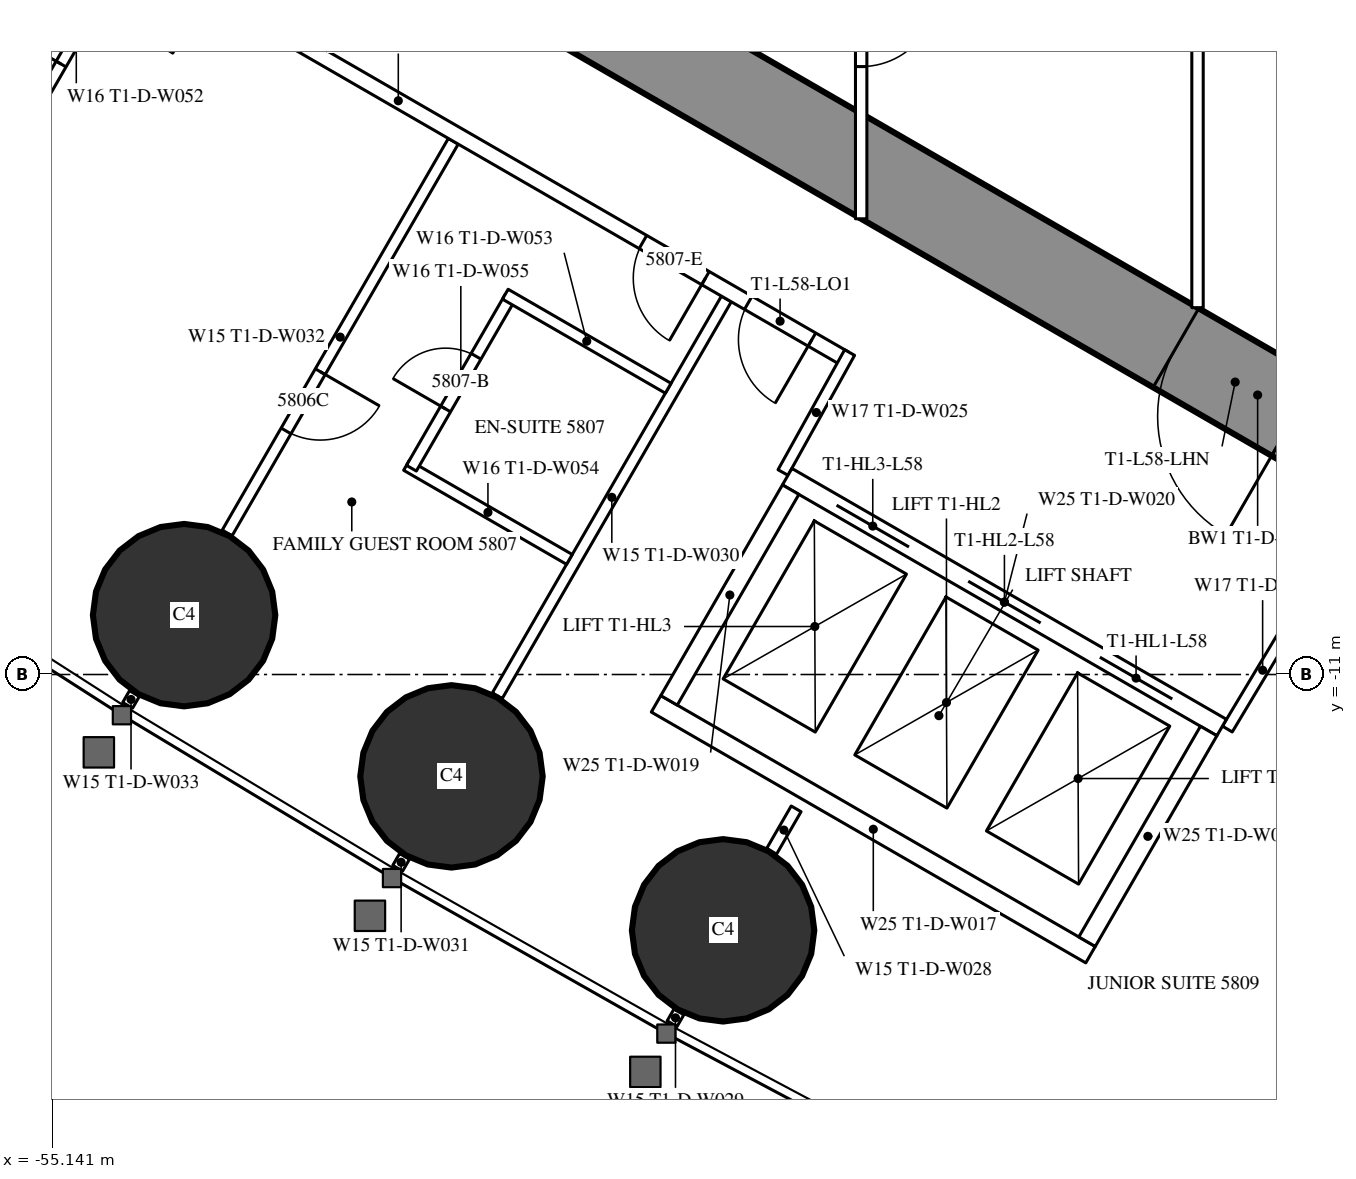
"""IFC4 building model, lengths in metres.
Left out: names, types, materials, properties, quantities, classifications, styles, units other than length and angle.
Written with IfcOpenShell. Run it as: python <this file> out.ifc"""

import sys

from ifc_helpers import new_model, si_unit, direction, frame, frame_2d, origin, origin_2d, place, context, subcontext, project, spatial, rectangle, circle, extrude, element, fill, save


model = new_model("IFC4")
c1 = context("Model", 3, precision=1e-05, world=origin(), true_north=direction((0.0, 1.0)))
c2 = subcontext(c1, "Body", "Model", "MODEL_VIEW")
j1 = project(units=[si_unit("LENGTHUNIT", "METRE"), si_unit("PLANEANGLEUNIT", "RADIAN")], contexts=[c1])
p1 = place(None, origin())
s1 = spatial("IfcSite", under=j1, at=p1, CompositionType="ELEMENT")
p2 = place(p1, origin())
s2 = spatial("IfcBuilding", under=s1, at=p2, CompositionType="ELEMENT")
p3 = place(p2, frame((0.0, 0.0, 218.9)))
s3 = spatial("IfcBuildingStorey", under=s2, at=p3, CompositionType="ELEMENT", Elevation=218.9)
for number, where, z_axis, x_axis in (
    (1, (-53.408, -10.219, 0.0), (0.0, 0.0, 1.0), (1.0, 0.0, 0.0)),
    (2, (-49.89, -12.34, 0.0), (0.0, 0.0, 1.0), (1.0, 0.0, 0.0)),
    (3, (-46.317, -14.365, 0.0), (0.0, 0.0, 1.0), (1.0, 0.0, 0.0)),
):
    element("IfcColumn", number, at=place(p3, frame(where, z_axis=z_axis, x_axis=x_axis)), inside=s3, PredefinedType="COLUMN", context=c2, shape_type="SweptSolid", body=[
        extrude(circle(Radius=1.2, at=origin_2d()), origin(), (0.0, 0.0, 1.0), 3.6),
    ])
p4 = place(p3, frame((-27.2, -14.3, 0.0), z_axis=(0.0, 0.0, 1.0), x_axis=(-0.866024021859, 0.500002393557, 0.0)))
e4 = element("IfcWall", 4, at=p4, inside=s3, PredefinedType="SHEAR", context=c2, shape_type="SweptSolid", body=[
    extrude(rectangle(XDim=27.907, YDim=1.2, at=frame_2d((13.954, 0.0))), origin(), (0.0, 0.0, 1.0), 3.6),
])
p5 = place(p4, frame((4.6, 0.0, 0.0)))
e5 = element("IfcOpeningElement", 5, at=p5, cuts=e4, PredefinedType="OPENING", context=c2, shape_type="SweptSolid", body=[
    extrude(rectangle(XDim=1.0, YDim=2.2, at=frame_2d((0.5, 1.1))), frame((0.0, 0.61, 0.0), z_axis=(0.0, -1.0, 0.0), x_axis=(1.0, 0.0, 0.0)), (0.0, 0.0, 1.0), 1.22),
])
p6 = place(p4, frame((13.395, 0.0, 0.0)))
e6 = element("IfcOpeningElement", 6, at=p6, cuts=e4, PredefinedType="OPENING", context=c2, shape_type="SweptSolid", body=[
    extrude(rectangle(XDim=1.8, YDim=2.2, at=frame_2d((0.9, 1.1))), frame((0.0, 0.61, 0.0), z_axis=(0.0, -1.0, 0.0), x_axis=(1.0, 0.0, 0.0)), (0.0, 0.0, 1.0), 1.22),
])
p7 = place(p3, frame((-46.898, -15.439, 0.0), z_axis=(0.0, 0.0, 1.0), x_axis=(-0.500232303069, -0.865891241997, 0.0)))
e7 = element("IfcWall", 7, at=p7, inside=s3, PredefinedType="PARTITIONING", context=c2, shape_type="SweptSolid", body=[
    extrude(rectangle(XDim=0.18, YDim=0.15, at=frame_2d((0.09, 0.0))), origin(), (0.0, 0.0, 1.0), 2.45),
])
p8 = place(p3, frame((-46.274, -6.059, 0.0), z_axis=(0.0, 0.0, 1.0), x_axis=(-0.500020471368, -0.866013584312, 0.0)))
e8 = element("IfcWall", 8, at=p8, inside=s3, PredefinedType="PARTITIONING", context=c2, shape_type="SweptSolid", body=[
    extrude(rectangle(XDim=6.028, YDim=0.15, at=frame_2d((3.014, 0.0))), origin(), (0.0, 0.0, 1.0), 2.45),
])
p9 = place(p3, frame((-50.508, -13.392, 0.0), z_axis=(0.0, 0.0, 1.0), x_axis=(-0.499644091975, -0.866230789891, 0.0)))
e9 = element("IfcWall", 9, at=p9, inside=s3, PredefinedType="PARTITIONING", context=c2, shape_type="SweptSolid", body=[
    extrude(rectangle(XDim=0.18, YDim=0.15, at=frame_2d((0.09, 0.0))), origin(), (0.0, 0.0, 1.0), 2.45),
])
p10 = place(p3, frame((-49.866, -3.985, 0.0), z_axis=(0.0, 0.0, 1.0), x_axis=(-0.500000694566, -0.866025002776, 0.0)))
e10 = element("IfcWall", 10, at=p10, inside=s3, PredefinedType="PARTITIONING", context=c2, shape_type="SweptSolid", body=[
    extrude(rectangle(XDim=5.95, YDim=0.15, at=frame_2d((2.975, 0.0))), origin(), (0.0, 0.0, 1.0), 2.45),
])
p11 = place(p10, frame((3.5, 0.0, 0.0)))
e11 = element("IfcOpeningElement", 11, at=p11, cuts=e10, PredefinedType="OPENING", context=c2, shape_type="SweptSolid", body=[
    extrude(rectangle(XDim=0.9, YDim=2.2, at=frame_2d((0.45, 1.1))), frame((0.0, 0.085, 0.0), z_axis=(0.0, -1.0, 0.0), x_axis=(1.0, 0.0, 0.0)), (0.0, 0.0, 1.0), 0.17),
])
p12 = place(p3, frame((-54.061, -11.25, 0.0), z_axis=(0.0, 0.0, 1.0), x_axis=(-0.500391173478, -0.865799441849, 0.0)))
e12 = element("IfcWall", 12, at=p12, inside=s3, PredefinedType="PARTITIONING", context=c2, shape_type="SweptSolid", body=[
    extrude(rectangle(XDim=0.179, YDim=0.15, at=frame_2d((0.089, 0.0))), origin(), (0.0, 0.0, 1.0), 2.45),
])
p13 = place(p3, frame((-45.356, -12.767, 0.0), z_axis=(0.0, 0.0, 1.0), x_axis=(-0.499886366516, -0.866091000168, 0.0)))
e13 = element("IfcWall", 13, at=p13, inside=s3, PredefinedType="PARTITIONING", context=c2, shape_type="SweptSolid", body=[
    extrude(rectangle(XDim=0.645, YDim=0.15, at=frame_2d((0.322, 0.0))), origin(), (0.0, 0.0, 1.0), 3.35),
])
p14 = place(p3, frame((-44.715, -6.844, 0.0), z_axis=(0.0, 0.0, 1.0), x_axis=(-0.866025261224, 0.500000246922, 0.0)))
e14 = element("IfcWall", 14, at=p14, inside=s3, PredefinedType="PARTITIONING", context=c2, shape_type="SweptSolid", body=[
    extrude(rectangle(XDim=13.567, YDim=0.2, at=frame_2d((6.783, 0.0))), origin(), (0.0, 0.0, 1.0), 3.35),
])
p15 = place(p14, frame((9.667, 0.0, 0.0)))
e15 = element("IfcOpeningElement", 15, at=p15, cuts=e14, PredefinedType="OPENING", context=c2, shape_type="SweptSolid", body=[
    extrude(rectangle(XDim=0.95, YDim=2.2, at=frame_2d((0.475, 1.1))), frame((0.0, 0.11, 0.0), z_axis=(0.0, -1.0, 0.0), x_axis=(1.0, 0.0, 0.0)), (0.0, 0.0, 1.0), 0.22),
])
p16 = place(p14, frame((2.117, 0.0, 0.0)))
e16 = element("IfcOpeningElement", 16, at=p16, cuts=e14, PredefinedType="OPENING", context=c2, shape_type="SweptSolid", body=[
    extrude(rectangle(XDim=0.95, YDim=2.2, at=frame_2d((0.475, 1.1))), frame((0.0, 0.11, 0.0), z_axis=(0.0, -1.0, 0.0), x_axis=(1.0, 0.0, 0.0)), (0.0, 0.0, 1.0), 0.22),
])
p17 = place(p14, frame((0.5, 0.0, 0.0)))
e17 = element("IfcOpeningElement", 17, at=p17, cuts=e14, PredefinedType="OPENING", context=c2, shape_type="SweptSolid", body=[
    extrude(rectangle(XDim=0.967, YDim=2.2, at=frame_2d((0.483, 1.1))), frame((0.0, 0.11, 0.0), z_axis=(0.0, -1.0, 0.0), x_axis=(1.0, 0.0, 0.0)), (0.0, 0.0, 1.0), 0.22),
])
for number, where, z_axis, x_axis in (
    (18, (-39.683, -11.718, 0.0), (0.0, 0.0, 1.0), (0.514, 0.858, 0.0)),
    (19, (-44.652, -6.764, 0.0), (0.0, 0.0, 1.0), (-0.485, -0.874, 0.0)),
):
    element("IfcWall", number, at=place(p3, frame(where, z_axis=z_axis, x_axis=x_axis)), inside=s3, PredefinedType="PARTITIONING", context=c2, shape_type="SweptSolid", body=[
        extrude(rectangle(XDim=1.805, YDim=0.15, at=frame_2d((0.903, 0.0))), origin(), (0.0, 0.0, 1.0), 3.35),
    ])
p18 = place(p3, frame((-54.176, -1.497, 0.0), z_axis=(0.0, 0.0, 1.0), x_axis=(-0.500006934395, -0.866021400173, 0.0)))
e20 = element("IfcWall", 20, at=p18, inside=s3, PredefinedType="PARTITIONING", context=c2, shape_type="SweptSolid", body=[
    extrude(rectangle(XDim=2.6, YDim=0.15, at=frame_2d((1.3, 0.0))), origin(), (0.0, 0.0, 1.0), 3.35),
])
p19 = place(p18, frame((0.9, 0.0, 0.0)))
e21 = element("IfcOpeningElement", 21, at=p19, cuts=e20, PredefinedType="OPENING", context=c2, shape_type="SweptSolid", body=[
    extrude(rectangle(XDim=0.8, YDim=2.2, at=frame_2d((0.4, 1.1))), frame((0.0, 0.085, 0.0), z_axis=(0.0, -1.0, 0.0), x_axis=(1.0, 0.0, 0.0)), (0.0, 0.0, 1.0), 0.17),
])
p20 = place(p3, frame((-48.339, -9.486, 0.0), z_axis=(0.0, 0.0, 1.0), x_axis=(-0.866006523861, 0.500032699561, 0.0)))
e22 = element("IfcWall", 22, at=p20, inside=s3, PredefinedType="PARTITIONING", context=c2, shape_type="SweptSolid", body=[
    extrude(rectangle(XDim=2.475, YDim=0.15, at=frame_2d((1.237, 0.0))), origin(), (0.0, 0.0, 1.0), 3.35),
])
p21 = place(p3, frame((-49.117, -6.034, 0.0), z_axis=(0.0, 0.0, 1.0), x_axis=(-0.500006934395, -0.866021400173, 0.0)))
e23 = element("IfcWall", 23, at=p21, inside=s3, PredefinedType="PARTITIONING", context=c2, shape_type="SweptSolid", body=[
    extrude(rectangle(XDim=2.6, YDim=0.15, at=frame_2d((1.3, 0.0))), origin(), (0.0, 0.0, 1.0), 3.35),
])
p22 = place(p21, frame((0.9, 0.0, 0.0)))
e24 = element("IfcOpeningElement", 24, at=p22, cuts=e23, PredefinedType="OPENING", context=c2, shape_type="SweptSolid", body=[
    extrude(rectangle(XDim=0.8, YDim=2.2, at=frame_2d((0.4, 1.1))), frame((0.0, 0.085, 0.0), z_axis=(0.0, -1.0, 0.0), x_axis=(1.0, 0.0, 0.0)), (0.0, 0.0, 1.0), 0.17),
])
p23 = place(p3, frame((-47.039, -7.234, 0.0), z_axis=(0.0, 0.0, 1.0), x_axis=(-0.866073894602, 0.499916002032, 0.0)))
e25 = element("IfcWall", 25, at=p23, inside=s3, PredefinedType="PARTITIONING", context=c2, shape_type="SweptSolid", body=[
    extrude(rectangle(XDim=2.475, YDim=0.15, at=frame_2d((1.238, 0.0))), origin(), (0.0, 0.0, 1.0), 2.5),
])
p24 = place(p3, frame((-40.075, 6.174, 0.0), z_axis=(0.0, 0.0, 1.0), x_axis=(0.0, -1.0, 0.0)))
e26 = element("IfcWall", 26, at=p24, inside=s3, PredefinedType="PARTITIONING", context=c2, shape_type="SweptSolid", body=[
    extrude(rectangle(XDim=12.348, YDim=0.15, at=frame_2d((6.174, 0.0))), origin(), (0.0, 0.0, 1.0), 3.35),
])
p25 = place(p24, frame((5.274, 0.0, 0.0)))
e27 = element("IfcOpeningElement", 27, at=p25, cuts=e26, PredefinedType="OPENING", context=c2, shape_type="SweptSolid", body=[
    extrude(rectangle(XDim=1.8, YDim=2.2, at=frame_2d((0.9, 1.1))), frame((0.0, 0.085, 0.0), z_axis=(0.0, -1.0, 0.0), x_axis=(1.0, 0.0, 0.0)), (0.0, 0.0, 1.0), 0.17),
])
p26 = place(p3, frame((-44.5, 5.005, 0.0), z_axis=(0.0, 0.0, 1.0), x_axis=(0.0, -1.0, 0.0)))
e28 = element("IfcWall", 28, at=p26, inside=s3, PredefinedType="PARTITIONING", context=c2, shape_type="SweptSolid", body=[
    extrude(rectangle(XDim=10.009, YDim=0.15, at=frame_2d((5.005, 0.0))), origin(), (0.0, 0.0, 1.0), 2.5),
])
p27 = place(p26, frame((2.002, 0.0, 0.0)))
e29 = element("IfcOpeningElement", 29, at=p27, cuts=e28, PredefinedType="OPENING", context=c2, shape_type="SweptSolid", body=[
    extrude(rectangle(XDim=1.0, YDim=2.2, at=frame_2d((0.5, 1.1))), frame((0.0, 0.085, 0.0), z_axis=(0.0, -1.0, 0.0), x_axis=(1.0, 0.0, 0.0)), (0.0, 0.0, 1.0), 0.17),
])
p28 = place(p26, frame((7.007, 0.0, 0.0)))
e30 = element("IfcOpeningElement", 30, at=p28, cuts=e28, PredefinedType="OPENING", context=c2, shape_type="SweptSolid", body=[
    extrude(rectangle(XDim=1.0, YDim=2.2, at=frame_2d((0.5, 1.1))), frame((0.0, 0.085, 0.0), z_axis=(0.0, -1.0, 0.0), x_axis=(1.0, 0.0, 0.0)), (0.0, 0.0, 1.0), 0.17),
])
p29 = place(p3, frame((-39.758, -11.697, 0.0), z_axis=(0.0, 0.0, 1.0), x_axis=(-0.866024194504, 0.500002094529, 0.0)))
e31 = element("IfcWall", 31, at=p29, inside=s3, PredefinedType="PARTITIONING", context=c2, shape_type="SweptSolid", body=[
    extrude(rectangle(XDim=6.6, YDim=0.25, at=frame_2d((3.3, 0.0))), origin(), (0.0, 0.0, 1.0), 3.35),
])
p30 = place(p29, frame((0.75, 0.0, 0.0)))
e32 = element("IfcOpeningElement", 32, at=p30, cuts=e31, PredefinedType="OPENING", context=c2, shape_type="SweptSolid", body=[
    extrude(rectangle(XDim=1.1, YDim=2.2, at=frame_2d((0.55, 1.1))), frame((0.0, 0.135, 0.0), z_axis=(0.0, -1.0, 0.0), x_axis=(1.0, 0.0, 0.0)), (0.0, 0.0, 1.0), 0.27),
])
p31 = place(p29, frame((2.75, 0.0, 0.0)))
e33 = element("IfcOpeningElement", 33, at=p31, cuts=e31, PredefinedType="OPENING", context=c2, shape_type="SweptSolid", body=[
    extrude(rectangle(XDim=1.1, YDim=2.2, at=frame_2d((0.55, 1.1))), frame((0.0, 0.135, 0.0), z_axis=(0.0, -1.0, 0.0), x_axis=(1.0, 0.0, 0.0)), (0.0, 0.0, 1.0), 0.27),
])
p32 = place(p29, frame((4.75, 0.0, 0.0)))
e34 = element("IfcOpeningElement", 34, at=p32, cuts=e31, PredefinedType="OPENING", context=c2, shape_type="SweptSolid", body=[
    extrude(rectangle(XDim=1.1, YDim=2.2, at=frame_2d((0.55, 1.1))), frame((0.0, 0.135, 0.0), z_axis=(0.0, -1.0, 0.0), x_axis=(1.0, 0.0, 0.0)), (0.0, 0.0, 1.0), 0.27),
])
p33 = place(p3, frame((-41.482, -14.686, 0.0), z_axis=(0.0, 0.0, 1.0), x_axis=(-0.86603344179, 0.499986077507, 0.0)))
e35 = element("IfcWall", 35, at=p33, inside=s3, PredefinedType="PARTITIONING", context=c2, shape_type="SweptSolid", body=[
    extrude(rectangle(XDim=6.6, YDim=0.25, at=frame_2d((3.3, 0.0))), origin(), (0.0, 0.0, 1.0), 3.35),
])
for number, where, z_axis, x_axis in (
    (36, (-39.928, -11.743, 0.0), (0.0, 0.0, 1.0), (-0.5, -0.866, 0.0)),
    (37, (-45.428, -8.568, 0.0), (0.0, 0.0, 1.0), (-0.5, -0.866, 0.0)),
):
    element("IfcWall", number, at=place(p3, frame(where, z_axis=z_axis, x_axis=x_axis)), inside=s3, PredefinedType="PARTITIONING", context=c2, shape_type="SweptSolid", body=[
        extrude(rectangle(XDim=3.201, YDim=0.25, at=frame_2d((1.6, 0.0))), origin(), (0.0, 0.0, 1.0), 3.35),
    ])
p34 = place(p19, origin())
e38 = element("IfcDoor", 38, at=p34, inside=s3, OperationType="SINGLE_SWING_RIGHT", PredefinedType="DOOR", context=c2, shape_type="SweptSolid", body=[
    extrude(rectangle(XDim=0.8, YDim=2.2, at=frame_2d((0.4, 1.1))), frame((0.0, 0.025, 0.0), z_axis=(0.0, -1.0, 0.0), x_axis=(1.0, 0.0, 0.0)), (0.0, 0.0, 1.0), 0.05),
])
fill(e21, e38)
p35 = place(p22, origin())
e39 = element("IfcDoor", 39, at=p35, inside=s3, OperationType="SINGLE_SWING_RIGHT", PredefinedType="DOOR", context=c2, shape_type="SweptSolid", body=[
    extrude(rectangle(XDim=0.8, YDim=2.2, at=frame_2d((0.4, 1.1))), frame((0.0, 0.025, 0.0), z_axis=(0.0, -1.0, 0.0), x_axis=(1.0, 0.0, 0.0)), (0.0, 0.0, 1.0), 0.05),
])
fill(e24, e39)
p36 = place(p16, origin())
e40 = element("IfcDoor", 40, at=p36, inside=s3, OperationType="SINGLE_SWING_LEFT", PredefinedType="DOOR", context=c2, shape_type="SweptSolid", body=[
    extrude(rectangle(XDim=0.95, YDim=2.2, at=frame_2d((0.475, 1.1))), frame((0.0, 0.025, 0.0), z_axis=(0.0, -1.0, 0.0), x_axis=(1.0, 0.0, 0.0)), (0.0, 0.0, 1.0), 0.05),
])
fill(e16, e40)
p37 = place(p17, origin())
e41 = element("IfcDoor", 41, at=p37, inside=s3, OperationType="SINGLE_SWING_LEFT", PredefinedType="DOOR", context=c2, shape_type="SweptSolid", body=[
    extrude(rectangle(XDim=0.967, YDim=2.2, at=frame_2d((0.483, 1.1))), frame((0.0, 0.025, 0.0), z_axis=(0.0, -1.0, 0.0), x_axis=(1.0, 0.0, 0.0)), (0.0, 0.0, 1.0), 0.05),
])
fill(e17, e41)
p38 = place(p11, origin())
e42 = element("IfcDoor", 42, at=p38, inside=s3, OperationType="SINGLE_SWING_LEFT", PredefinedType="DOOR", context=c2, shape_type="SweptSolid", body=[
    extrude(rectangle(XDim=0.9, YDim=2.2, at=frame_2d((0.45, 1.1))), frame((0.0, 0.025, 0.0), z_axis=(0.0, -1.0, 0.0), x_axis=(1.0, 0.0, 0.0)), (0.0, 0.0, 1.0), 0.05),
])
fill(e11, e42)
p39 = place(p28, origin())
e43 = element("IfcDoor", 43, at=p39, inside=s3, OperationType="SINGLE_SWING_LEFT", PredefinedType="DOOR", context=c2, shape_type="SweptSolid", body=[
    extrude(rectangle(XDim=1.0, YDim=2.2, at=frame_2d((0.5, 1.1))), frame((0.0, 0.025, 0.0), z_axis=(0.0, -1.0, 0.0), x_axis=(1.0, 0.0, 0.0)), (0.0, 0.0, 1.0), 0.05),
])
fill(e30, e43)
p40 = place(p6, origin())
e44 = element("IfcDoor", 44, at=p40, inside=s3, OperationType="DOUBLE_DOOR_SINGLE_SWING", PredefinedType="DOOR", context=c2, shape_type="SweptSolid", body=[
    extrude(rectangle(XDim=1.8, YDim=2.2, at=frame_2d((0.9, 1.1))), frame((0.0, 0.025, 0.0), z_axis=(0.0, -1.0, 0.0), x_axis=(1.0, 0.0, 0.0)), (0.0, 0.0, 1.0), 0.05),
])
fill(e6, e44)
p41 = place(p30, origin())
e45 = element("IfcDoor", 45, at=p41, inside=s3, OperationType="DOUBLE_DOOR_SLIDING", PredefinedType="USERDEFINED", context=c2, shape_type="SweptSolid", body=[
    extrude(rectangle(XDim=1.1, YDim=2.2, at=frame_2d((0.55, 1.1))), frame((0.0, 0.025, 0.0), z_axis=(0.0, -1.0, 0.0), x_axis=(1.0, 0.0, 0.0)), (0.0, 0.0, 1.0), 0.05),
])
fill(e32, e45)
p42 = place(p31, origin())
e46 = element("IfcDoor", 46, at=p42, inside=s3, OperationType="DOUBLE_DOOR_SLIDING", PredefinedType="USERDEFINED", context=c2, shape_type="SweptSolid", body=[
    extrude(rectangle(XDim=1.1, YDim=2.2, at=frame_2d((0.55, 1.1))), frame((0.0, 0.025, 0.0), z_axis=(0.0, -1.0, 0.0), x_axis=(1.0, 0.0, 0.0)), (0.0, 0.0, 1.0), 0.05),
])
fill(e33, e46)
p43 = place(p32, origin())
e47 = element("IfcDoor", 47, at=p43, inside=s3, OperationType="DOUBLE_DOOR_SLIDING", PredefinedType="USERDEFINED", context=c2, shape_type="SweptSolid", body=[
    extrude(rectangle(XDim=1.1, YDim=2.2, at=frame_2d((0.55, 1.1))), frame((0.0, 0.025, 0.0), z_axis=(0.0, -1.0, 0.0), x_axis=(1.0, 0.0, 0.0)), (0.0, 0.0, 1.0), 0.05),
])
fill(e34, e47)
save(model, sys.argv[1])
